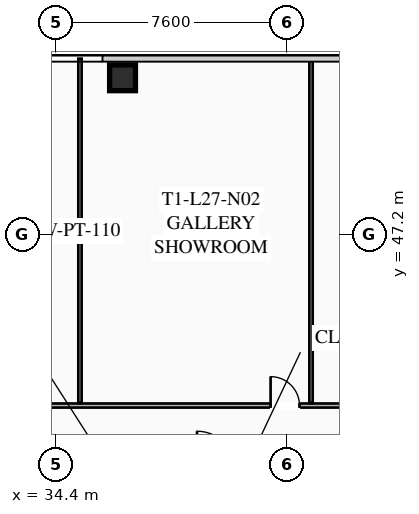
"""IFC4 building model, lengths in metres.
Left out: names, types, materials, properties, quantities, classifications, styles, units other than length and angle.
Written with IfcOpenShell. Run it as: python <this file> out.ifc"""

import sys

from ifc_helpers import new_model, si_unit, direction, frame, frame_2d, origin, origin_2d, place, context, subcontext, project, spatial, rectangle, hollow_rectangle, extrude, element, fill, save


model = new_model("IFC4")
c1 = context("Model", 3, precision=1e-05, world=origin(), true_north=direction((0.0, 1.0)))
c2 = subcontext(c1, "Body", "Model", "MODEL_VIEW")
j1 = project(units=[si_unit("LENGTHUNIT", "METRE"), si_unit("PLANEANGLEUNIT", "RADIAN")], contexts=[c1])
p1 = place(None, origin())
s1 = spatial("IfcSite", under=j1, at=p1, CompositionType="ELEMENT")
p2 = place(p1, origin())
s2 = spatial("IfcBuilding", under=s1, at=p2, CompositionType="ELEMENT")
p3 = place(p2, frame((0.0, 0.0, 102.7)))
s3 = spatial("IfcBuildingStorey", under=s2, at=p3, CompositionType="ELEMENT", Elevation=102.7)
p4 = place(p3, frame((36.6, 52.35, 0.0), z_axis=(0.0, 0.0, 1.0), x_axis=(1.0, 0.0, 0.0)))
e1 = element("IfcColumn", 1, at=p4, inside=s3, PredefinedType="COLUMN", context=c2, shape_type="SweptSolid", body=[
    extrude(hollow_rectangle(XDim=0.85, YDim=0.85, WallThickness=0.035, at=origin_2d()), origin(), (0.0, 0.0, 1.0), 3.35),
])
p5 = place(p3, frame((24.05, 41.57, 0.0), z_axis=(0.0, 0.0, 1.0), x_axis=(1.0, 0.0, 0.0)))
e2 = element("IfcWall", 2, at=p5, inside=s3, PredefinedType="PARTITIONING", context=c2, shape_type="SweptSolid", body=[
    extrude(rectangle(XDim=27.3, YDim=0.135, at=frame_2d((13.65, 0.0))), origin(), (0.0, 0.0, 1.0), 2.703),
])
p6 = place(p5, frame((0.3, 0.0, 0.0)))
e3 = element("IfcOpeningElement", 3, at=p6, cuts=e2, PredefinedType="OPENING", context=c2, shape_type="SweptSolid", body=[
    extrude(rectangle(XDim=0.95, YDim=2.05, at=frame_2d((0.475, 1.025))), frame((0.0, 0.077, 0.0), z_axis=(0.0, -1.0, 0.0), x_axis=(1.0, 0.0, 0.0)), (0.0, 0.0, 1.0), 0.155),
])
p7 = place(p5, frame((17.42, 0.0, 0.0)))
e4 = element("IfcOpeningElement", 4, at=p7, cuts=e2, PredefinedType="OPENING", context=c2, shape_type="SweptSolid", body=[
    extrude(rectangle(XDim=0.95, YDim=2.05, at=frame_2d((0.475, 1.025))), frame((0.0, 0.077, 0.0), z_axis=(0.0, -1.0, 0.0), x_axis=(1.0, 0.0, 0.0)), (0.0, 0.0, 1.0), 0.155),
])
p8 = place(p5, frame((21.437, 0.0, 0.0)))
e5 = element("IfcOpeningElement", 5, at=p8, cuts=e2, PredefinedType="OPENING", context=c2, shape_type="SweptSolid", body=[
    extrude(rectangle(XDim=0.95, YDim=2.05, at=frame_2d((0.475, 1.025))), frame((0.0, 0.077, 0.0), z_axis=(0.0, -1.0, 0.0), x_axis=(1.0, 0.0, 0.0)), (0.0, 0.0, 1.0), 0.155),
])
for number, where, z_axis, x_axis in (
    (6, (35.2, 41.65, 0.0), (0.0, 0.0, 1.0), (0.0, 1.0, 0.0)),
    (7, (42.8, 41.65, 0.0), (0.0, 0.0, 1.0), (0.0, 1.0, 0.0)),
):
    element("IfcWall", number, at=place(p3, frame(where, z_axis=z_axis, x_axis=x_axis)), inside=s3, PredefinedType="PARTITIONING", context=c2, shape_type="SweptSolid", body=[
        extrude(rectangle(XDim=11.33, YDim=0.11, at=frame_2d((5.665, 0.0))), origin(), (0.0, 0.0, 1.0), 2.703),
    ])
p9 = place(p7, origin())
e8 = element("IfcDoor", 8, at=p9, inside=s3, OperationType="SINGLE_SWING_LEFT", PredefinedType="DOOR", context=c2, shape_type="SweptSolid", body=[
    extrude(rectangle(XDim=0.95, YDim=2.05, at=frame_2d((0.475, 1.025))), frame((0.0, 0.025, 0.0), z_axis=(0.0, -1.0, 0.0), x_axis=(1.0, 0.0, 0.0)), (0.0, 0.0, 1.0), 0.05),
])
fill(e4, e8)
save(model, sys.argv[1])
